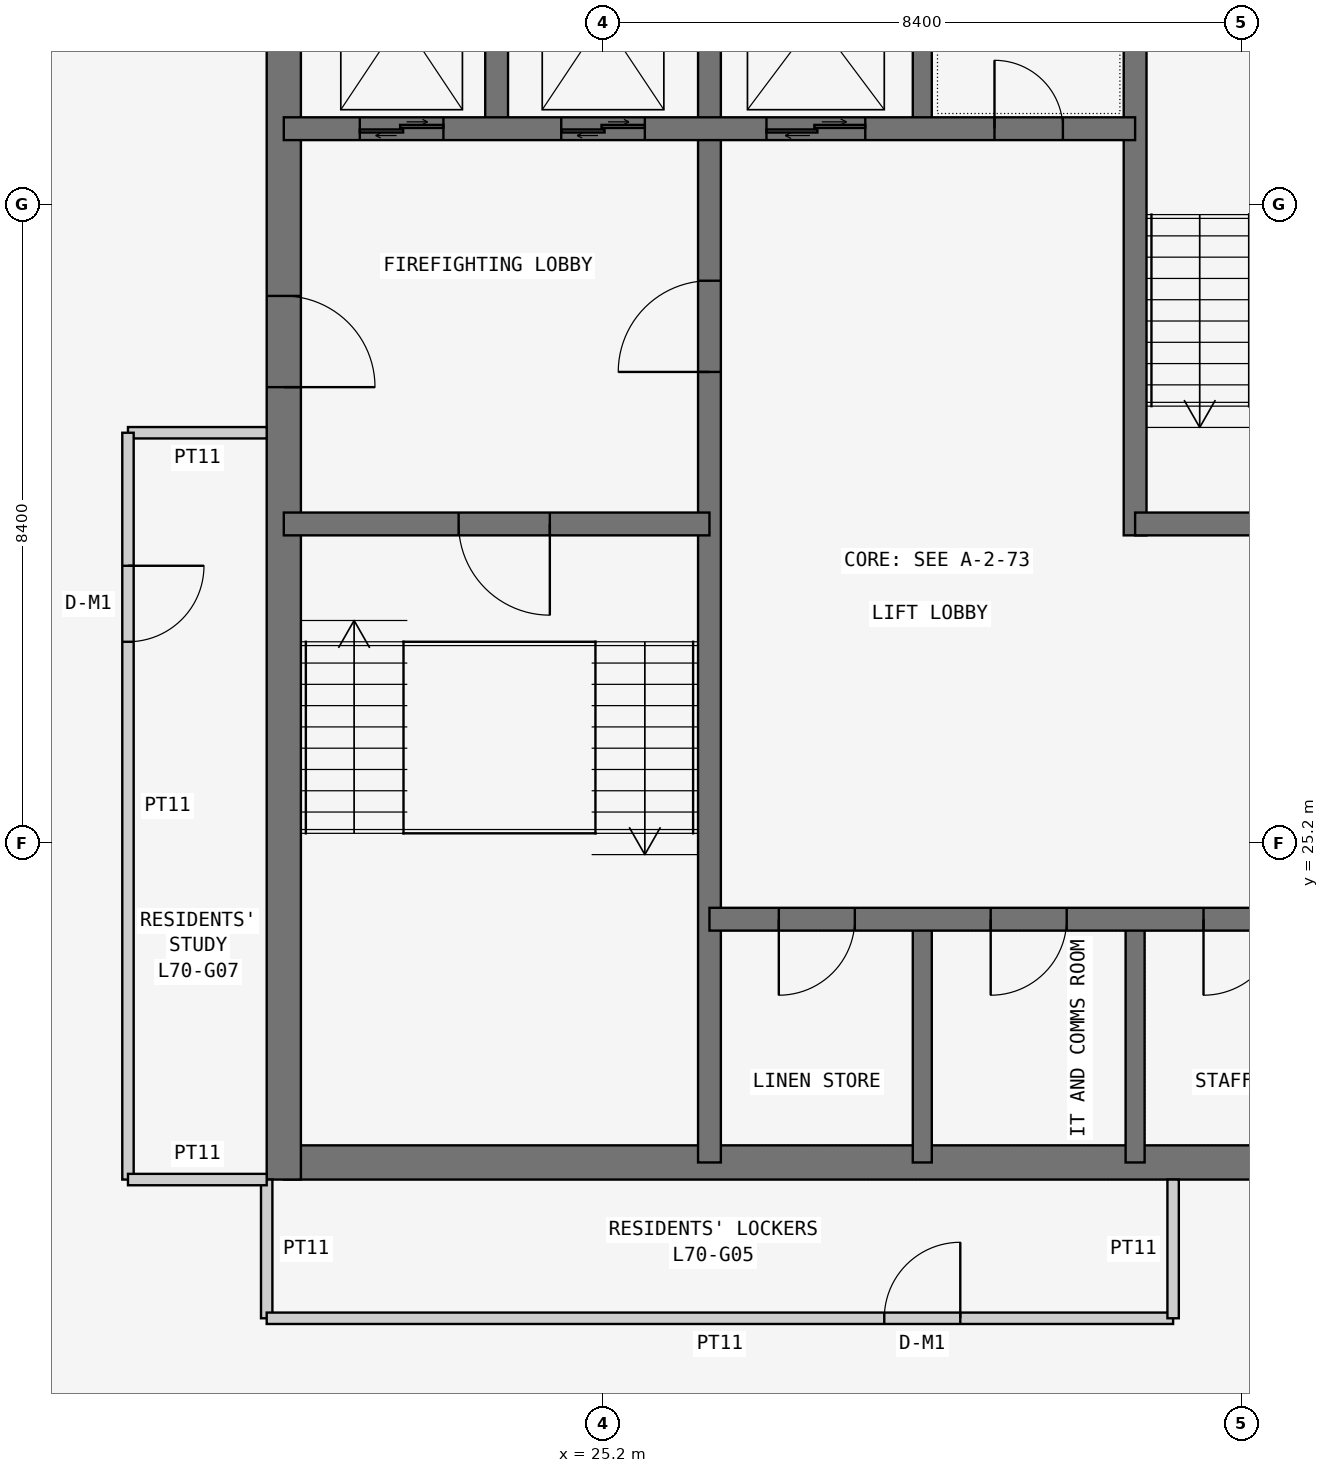
"""IFC4 building model, lengths in metres.
Left out: names, types, materials, properties, quantities, classifications, styles, units other than length and angle.
Written with IfcOpenShell. Run it as: python <this file> out.ifc"""

import sys

from ifc_helpers import new_model, si_unit, direction, frame, frame_2d, origin, place, context, subcontext, project, spatial, rectangle, extrude, element, fill, save


model = new_model("IFC4")
c1 = context("Model", 3, precision=1e-05, world=origin(), true_north=direction((0.0, 1.0)))
c2 = subcontext(c1, "Body", "Model", "MODEL_VIEW")
j1 = project(units=[si_unit("LENGTHUNIT", "METRE"), si_unit("PLANEANGLEUNIT", "RADIAN")], contexts=[c1])
p1 = place(None, origin())
s1 = spatial("IfcSite", under=j1, at=p1, CompositionType="ELEMENT")
p2 = place(p1, origin())
s2 = spatial("IfcBuilding", under=s1, at=p2, CompositionType="ELEMENT")
p3 = place(p2, frame((0.0, 0.0, 268.5)))
s3 = spatial("IfcBuildingStorey", under=s2, at=p3, CompositionType="ELEMENT", Elevation=268.5)
p4 = place(p3, frame((21.0, 21.0, 0.0), z_axis=(0.0, 0.0, 1.0), x_axis=(1.0, 0.0, 0.0)))
e1 = element("IfcWall", 1, at=p4, inside=s3, PredefinedType="SHEAR", context=c2, shape_type="SweptSolid", body=[
    extrude(rectangle(XDim=17.025, YDim=0.45, at=frame_2d((8.512, 0.0))), origin(), (0.0, 0.0, 1.0), 3.6),
])
p5 = place(p3, frame((21.0, 37.8, 0.0), z_axis=(0.0, 0.0, 1.0), x_axis=(0.0, -1.0, 0.0)))
e2 = element("IfcWall", 2, at=p5, inside=s3, PredefinedType="SHEAR", context=c2, shape_type="SweptSolid", body=[
    extrude(rectangle(XDim=17.025, YDim=0.45, at=frame_2d((8.513, 0.0))), origin(), (0.0, 0.0, 1.0), 3.6),
])
p6 = place(p5, frame((5.4, 0.0, 0.0)))
e3 = element("IfcOpeningElement", 3, at=p6, cuts=e2, PredefinedType="OPENING", context=c2, shape_type="SweptSolid", body=[
    extrude(rectangle(XDim=1.2, YDim=2.1, at=frame_2d((0.6, 1.05))), frame((0.0, 0.235, 0.0), z_axis=(0.0, -1.0, 0.0), x_axis=(1.0, 0.0, 0.0)), (0.0, 0.0, 1.0), 0.47),
])
p7 = place(p3, frame((26.6, 21.0, 0.0), z_axis=(0.0, 0.0, 1.0), x_axis=(0.0, 1.0, 0.0)))
e4 = element("IfcWall", 4, at=p7, inside=s3, PredefinedType="SHEAR", context=c2, shape_type="SweptSolid", body=[
    extrude(rectangle(XDim=16.8, YDim=0.3, at=frame_2d((8.4, 0.0))), origin(), (0.0, 0.0, 1.0), 3.6),
])
p8 = place(p7, frame((10.4, 0.0, 0.0)))
e5 = element("IfcOpeningElement", 5, at=p8, cuts=e4, PredefinedType="OPENING", context=c2, shape_type="SweptSolid", body=[
    extrude(rectangle(XDim=1.2, YDim=2.1, at=frame_2d((0.6, 1.05))), frame((0.0, 0.16, 0.0), z_axis=(0.0, -1.0, 0.0), x_axis=(1.0, 0.0, 0.0)), (0.0, 0.0, 1.0), 0.32),
])
p9 = place(p3, frame((21.0, 29.4, 0.0), z_axis=(0.0, 0.0, 1.0), x_axis=(1.0, 0.0, 0.0)))
e6 = element("IfcWall", 6, at=p9, inside=s3, PredefinedType="SHEAR", context=c2, shape_type="SweptSolid", body=[
    extrude(rectangle(XDim=5.6, YDim=0.3, at=frame_2d((2.8, 0.0))), origin(), (0.0, 0.0, 1.0), 3.6),
])
p10 = place(p9, frame((2.3, 0.0, 0.0)))
e7 = element("IfcOpeningElement", 7, at=p10, cuts=e6, PredefinedType="OPENING", context=c2, shape_type="SweptSolid", body=[
    extrude(rectangle(XDim=1.2, YDim=2.1, at=frame_2d((0.6, 1.05))), frame((0.0, 0.16, 0.0), z_axis=(0.0, -1.0, 0.0), x_axis=(1.0, 0.0, 0.0)), (0.0, 0.0, 1.0), 0.32),
])
p11 = place(p3, frame((21.0, 34.6, 0.0), z_axis=(0.0, 0.0, 1.0), x_axis=(1.0, 0.0, 0.0)))
e8 = element("IfcWall", 8, at=p11, inside=s3, PredefinedType="SHEAR", context=c2, shape_type="SweptSolid", body=[
    extrude(rectangle(XDim=11.2, YDim=0.3, at=frame_2d((5.6, 0.0))), origin(), (0.0, 0.0, 1.0), 3.6),
])
p12 = place(p11, frame((9.35, 0.0, 0.0)))
e9 = element("IfcOpeningElement", 9, at=p12, cuts=e8, PredefinedType="OPENING", context=c2, shape_type="SweptSolid", body=[
    extrude(rectangle(XDim=0.9, YDim=2.1, at=frame_2d((0.45, 1.05))), frame((0.0, 0.16, 0.0), z_axis=(0.0, -1.0, 0.0), x_axis=(1.0, 0.0, 0.0)), (0.0, 0.0, 1.0), 0.32),
])
p13 = place(p11, frame((1.0, 0.0, 0.0)))
e10 = element("IfcOpeningElement", 10, at=p13, cuts=e8, PredefinedType="OPENING", context=c2, shape_type="SweptSolid", body=[
    extrude(rectangle(XDim=1.1, YDim=2.1, at=frame_2d((0.55, 1.05))), frame((0.0, 0.16, 0.0), z_axis=(0.0, -1.0, 0.0), x_axis=(1.0, 0.0, 0.0)), (0.0, 0.0, 1.0), 0.32),
])
p14 = place(p11, frame((3.65, 0.0, 0.0)))
e11 = element("IfcOpeningElement", 11, at=p14, cuts=e8, PredefinedType="OPENING", context=c2, shape_type="SweptSolid", body=[
    extrude(rectangle(XDim=1.1, YDim=2.1, at=frame_2d((0.55, 1.05))), frame((0.0, 0.16, 0.0), z_axis=(0.0, -1.0, 0.0), x_axis=(1.0, 0.0, 0.0)), (0.0, 0.0, 1.0), 0.32),
])
p15 = place(p11, frame((6.35, 0.0, 0.0)))
e12 = element("IfcOpeningElement", 12, at=p15, cuts=e8, PredefinedType="OPENING", context=c2, shape_type="SweptSolid", body=[
    extrude(rectangle(XDim=1.3, YDim=2.1, at=frame_2d((0.65, 1.05))), frame((0.0, 0.16, 0.0), z_axis=(0.0, -1.0, 0.0), x_axis=(1.0, 0.0, 0.0)), (0.0, 0.0, 1.0), 0.32),
])
p16 = place(p3, frame((23.8, 34.6, 0.0), z_axis=(0.0, 0.0, 1.0), x_axis=(0.0, 1.0, 0.0)))
e13 = element("IfcWall", 13, at=p16, inside=s3, PredefinedType="SHEAR", context=c2, shape_type="SweptSolid", body=[
    extrude(rectangle(XDim=3.2, YDim=0.3, at=frame_2d((1.6, 0.0))), origin(), (0.0, 0.0, 1.0), 3.6),
])
p17 = place(p3, frame((26.6, 24.2, 0.0), z_axis=(0.0, 0.0, 1.0), x_axis=(1.0, 0.0, 0.0)))
e14 = element("IfcWall", 14, at=p17, inside=s3, PredefinedType="SHEAR", context=c2, shape_type="SweptSolid", body=[
    extrude(rectangle(XDim=11.2, YDim=0.3, at=frame_2d((5.6, 0.0))), origin(), (0.0, 0.0, 1.0), 3.6),
])
p18 = place(p17, frame((0.913, 0.0, 0.0)))
e15 = element("IfcOpeningElement", 15, at=p18, cuts=e14, PredefinedType="OPENING", context=c2, shape_type="SweptSolid", body=[
    extrude(rectangle(XDim=1.0, YDim=2.1, at=frame_2d((0.5, 1.05))), frame((0.0, 0.16, 0.0), z_axis=(0.0, -1.0, 0.0), x_axis=(1.0, 0.0, 0.0)), (0.0, 0.0, 1.0), 0.32),
])
p19 = place(p17, frame((3.7, 0.0, 0.0)))
e16 = element("IfcOpeningElement", 16, at=p19, cuts=e14, PredefinedType="OPENING", context=c2, shape_type="SweptSolid", body=[
    extrude(rectangle(XDim=1.0, YDim=2.1, at=frame_2d((0.5, 1.05))), frame((0.0, 0.16, 0.0), z_axis=(0.0, -1.0, 0.0), x_axis=(1.0, 0.0, 0.0)), (0.0, 0.0, 1.0), 0.32),
])
p20 = place(p17, frame((6.5, 0.0, 0.0)))
e17 = element("IfcOpeningElement", 17, at=p20, cuts=e14, PredefinedType="OPENING", context=c2, shape_type="SweptSolid", body=[
    extrude(rectangle(XDim=1.0, YDim=2.1, at=frame_2d((0.5, 1.05))), frame((0.0, 0.16, 0.0), z_axis=(0.0, -1.0, 0.0), x_axis=(1.0, 0.0, 0.0)), (0.0, 0.0, 1.0), 0.32),
])
p21 = place(p17, frame((9.1, 0.0, 0.0)))
e18 = element("IfcOpeningElement", 18, at=p21, cuts=e14, PredefinedType="OPENING", context=c2, shape_type="SweptSolid", body=[
    extrude(rectangle(XDim=1.1, YDim=2.1, at=frame_2d((0.55, 1.05))), frame((0.0, 0.16, 0.0), z_axis=(0.0, -1.0, 0.0), x_axis=(1.0, 0.0, 0.0)), (0.0, 0.0, 1.0), 0.32),
])
p22 = place(p3, frame((32.2, 29.25, 0.0), z_axis=(0.0, 0.0, 1.0), x_axis=(0.0, 1.0, 0.0)))
e19 = element("IfcWall", 19, at=p22, inside=s3, PredefinedType="SHEAR", context=c2, shape_type="SweptSolid", body=[
    extrude(rectangle(XDim=8.55, YDim=0.3, at=frame_2d((4.275, 0.0))), origin(), (0.0, 0.0, 1.0), 3.6),
])
p23 = place(p3, frame((32.2, 29.4, 0.0), z_axis=(0.0, 0.0, 1.0), x_axis=(1.0, 0.0, 0.0)))
e20 = element("IfcWall", 20, at=p23, inside=s3, PredefinedType="SHEAR", context=c2, shape_type="SweptSolid", body=[
    extrude(rectangle(XDim=5.6, YDim=0.3, at=frame_2d((2.8, 0.0))), origin(), (0.0, 0.0, 1.0), 3.6),
])
p24 = place(p23, frame((2.0, 0.0, 0.0)))
e21 = element("IfcOpeningElement", 21, at=p24, cuts=e20, PredefinedType="OPENING", context=c2, shape_type="SweptSolid", body=[
    extrude(rectangle(XDim=1.2, YDim=2.1, at=frame_2d((0.6, 1.05))), frame((0.0, 0.16, 0.0), z_axis=(0.0, -1.0, 0.0), x_axis=(1.0, 0.0, 0.0)), (0.0, 0.0, 1.0), 0.32),
])
for number, where, z_axis, x_axis in (
    (22, (29.4, 21.0, 0.0), (0.0, 0.0, 1.0), (0.0, 1.0, 0.0)),
    (23, (32.2, 21.0, 0.0), (0.0, 0.0, 1.0), (0.0, 1.0, 0.0)),
    (24, (29.4, 34.6, 0.0), (0.0, 0.0, 1.0), (0.0, 1.0, 0.0)),
):
    element("IfcWall", number, at=place(p3, frame(where, z_axis=z_axis, x_axis=x_axis)), inside=s3, PredefinedType="SHEAR", context=c2, shape_type="SweptSolid", body=[
        extrude(rectangle(XDim=3.2, YDim=0.25, at=frame_2d((1.6, 0.0))), origin(), (0.0, 0.0, 1.0), 3.6),
    ])
p25 = place(p3, frame((20.775, 20.775, 0.0), z_axis=(0.0, 0.0, 1.0), x_axis=(0.0, -1.0, 0.0)))
e25 = element("IfcWall", 25, at=p25, inside=s3, PredefinedType="PARTITIONING", context=c2, shape_type="SweptSolid", body=[
    extrude(rectangle(XDim=1.825, YDim=0.15, at=frame_2d((0.913, 0.0))), origin(), (0.0, 0.0, 1.0), 3.45),
])
p26 = place(p3, frame((20.775, 18.95, 0.0), z_axis=(0.0, 0.0, 1.0), x_axis=(1.0, 0.0, 0.0)))
e26 = element("IfcWall", 26, at=p26, inside=s3, PredefinedType="PARTITIONING", context=c2, shape_type="SweptSolid", body=[
    extrude(rectangle(XDim=11.925, YDim=0.15, at=frame_2d((5.962, 0.0))), origin(), (0.0, 0.0, 1.0), 3.45),
])
p27 = place(p26, frame((8.125, 0.0, 0.0)))
e27 = element("IfcOpeningElement", 27, at=p27, cuts=e26, PredefinedType="OPENING", context=c2, shape_type="SweptSolid", body=[
    extrude(rectangle(XDim=1.0, YDim=2.1, at=frame_2d((0.5, 1.05))), frame((0.0, 0.085, 0.0), z_axis=(0.0, -1.0, 0.0), x_axis=(1.0, 0.0, 0.0)), (0.0, 0.0, 1.0), 0.17),
])
for number, where, z_axis, x_axis in (
    (28, (32.7, 18.95, 0.0), (0.0, 0.0, 1.0), (0.0, 1.0, 0.0)),
    (29, (20.775, 30.6, 0.0), (0.0, 0.0, 1.0), (-1.0, 0.0, 0.0)),
):
    element("IfcWall", number, at=place(p3, frame(where, z_axis=z_axis, x_axis=x_axis)), inside=s3, PredefinedType="PARTITIONING", context=c2, shape_type="SweptSolid", body=[
        extrude(rectangle(XDim=1.825, YDim=0.15, at=frame_2d((0.913, 0.0))), origin(), (0.0, 0.0, 1.0), 3.45),
    ])
p28 = place(p3, frame((18.95, 30.6, 0.0), z_axis=(0.0, 0.0, 1.0), x_axis=(0.0, -1.0, 0.0)))
e30 = element("IfcWall", 30, at=p28, inside=s3, PredefinedType="PARTITIONING", context=c2, shape_type="SweptSolid", body=[
    extrude(rectangle(XDim=9.825, YDim=0.15, at=frame_2d((4.913, 0.0))), origin(), (0.0, 0.0, 1.0), 3.45),
])
p29 = place(p28, frame((1.75, 0.0, 0.0)))
e31 = element("IfcOpeningElement", 31, at=p29, cuts=e30, PredefinedType="OPENING", context=c2, shape_type="SweptSolid", body=[
    extrude(rectangle(XDim=1.0, YDim=2.1, at=frame_2d((0.5, 1.05))), frame((0.0, 0.085, 0.0), z_axis=(0.0, -1.0, 0.0), x_axis=(1.0, 0.0, 0.0)), (0.0, 0.0, 1.0), 0.17),
])
p30 = place(p3, frame((18.95, 20.775, 0.0), z_axis=(0.0, 0.0, 1.0), x_axis=(1.0, 0.0, 0.0)))
e32 = element("IfcWall", 32, at=p30, inside=s3, PredefinedType="PARTITIONING", context=c2, shape_type="SweptSolid", body=[
    extrude(rectangle(XDim=1.825, YDim=0.15, at=frame_2d((0.913, 0.0))), origin(), (0.0, 0.0, 1.0), 3.45),
])
p31 = place(p27, origin())
e33 = element("IfcDoor", 33, at=p31, inside=s3, OperationType="SINGLE_SWING_RIGHT", PredefinedType="DOOR", context=c2, shape_type="SweptSolid", body=[
    extrude(rectangle(XDim=1.0, YDim=2.1, at=frame_2d((0.5, 1.05))), frame((0.0, 0.025, 0.0), z_axis=(0.0, -1.0, 0.0), x_axis=(1.0, 0.0, 0.0)), (0.0, 0.0, 1.0), 0.05),
])
fill(e27, e33)
p32 = place(p29, origin())
e34 = element("IfcDoor", 34, at=p32, inside=s3, OperationType="SINGLE_SWING_LEFT", PredefinedType="DOOR", context=c2, shape_type="SweptSolid", body=[
    extrude(rectangle(XDim=1.0, YDim=2.1, at=frame_2d((0.5, 1.05))), frame((0.0, 0.025, 0.0), z_axis=(0.0, -1.0, 0.0), x_axis=(1.0, 0.0, 0.0)), (0.0, 0.0, 1.0), 0.05),
])
fill(e31, e34)
p33 = place(p6, origin())
e35 = element("IfcDoor", 35, at=p33, inside=s3, OperationType="SINGLE_SWING_RIGHT", PredefinedType="DOOR", context=c2, shape_type="SweptSolid", body=[
    extrude(rectangle(XDim=1.2, YDim=2.1, at=frame_2d((0.6, 1.05))), frame((0.0, 0.025, 0.0), z_axis=(0.0, -1.0, 0.0), x_axis=(1.0, 0.0, 0.0)), (0.0, 0.0, 1.0), 0.05),
])
fill(e3, e35)
p34 = place(p10, frame((1.2, 0.0, 0.0), z_axis=(0.0, 0.0, 1.0), x_axis=(-1.0, 0.0, 0.0)))
e36 = element("IfcDoor", 36, at=p34, inside=s3, OperationType="SINGLE_SWING_LEFT", PredefinedType="DOOR", context=c2, shape_type="SweptSolid", body=[
    extrude(rectangle(XDim=1.2, YDim=2.1, at=frame_2d((0.6, 1.05))), frame((0.0, 0.025, 0.0), z_axis=(0.0, -1.0, 0.0), x_axis=(1.0, 0.0, 0.0)), (0.0, 0.0, 1.0), 0.05),
])
fill(e7, e36)
p35 = place(p8, origin())
e37 = element("IfcDoor", 37, at=p35, inside=s3, OperationType="SINGLE_SWING_LEFT", PredefinedType="DOOR", context=c2, shape_type="SweptSolid", body=[
    extrude(rectangle(XDim=1.2, YDim=2.1, at=frame_2d((0.6, 1.05))), frame((0.0, 0.025, 0.0), z_axis=(0.0, -1.0, 0.0), x_axis=(1.0, 0.0, 0.0)), (0.0, 0.0, 1.0), 0.05),
])
fill(e5, e37)
p36 = place(p12, origin())
e38 = element("IfcDoor", 38, at=p36, inside=s3, OperationType="SINGLE_SWING_LEFT", PredefinedType="DOOR", context=c2, shape_type="SweptSolid", body=[
    extrude(rectangle(XDim=0.9, YDim=2.1, at=frame_2d((0.45, 1.05))), frame((0.0, 0.025, 0.0), z_axis=(0.0, -1.0, 0.0), x_axis=(1.0, 0.0, 0.0)), (0.0, 0.0, 1.0), 0.05),
])
fill(e9, e38)
p37 = place(p18, frame((1.0, 0.0, 0.0), z_axis=(0.0, 0.0, 1.0), x_axis=(-1.0, 0.0, 0.0)))
e39 = element("IfcDoor", 39, at=p37, inside=s3, OperationType="SINGLE_SWING_RIGHT", PredefinedType="DOOR", context=c2, shape_type="SweptSolid", body=[
    extrude(rectangle(XDim=1.0, YDim=2.1, at=frame_2d((0.5, 1.05))), frame((0.0, 0.025, 0.0), z_axis=(0.0, -1.0, 0.0), x_axis=(1.0, 0.0, 0.0)), (0.0, 0.0, 1.0), 0.05),
])
fill(e15, e39)
p38 = place(p19, frame((1.0, 0.0, 0.0), z_axis=(0.0, 0.0, 1.0), x_axis=(-1.0, 0.0, 0.0)))
e40 = element("IfcDoor", 40, at=p38, inside=s3, OperationType="SINGLE_SWING_RIGHT", PredefinedType="DOOR", context=c2, shape_type="SweptSolid", body=[
    extrude(rectangle(XDim=1.0, YDim=2.1, at=frame_2d((0.5, 1.05))), frame((0.0, 0.025, 0.0), z_axis=(0.0, -1.0, 0.0), x_axis=(1.0, 0.0, 0.0)), (0.0, 0.0, 1.0), 0.05),
])
fill(e16, e40)
p39 = place(p20, frame((1.0, 0.0, 0.0), z_axis=(0.0, 0.0, 1.0), x_axis=(-1.0, 0.0, 0.0)))
e41 = element("IfcDoor", 41, at=p39, inside=s3, OperationType="SINGLE_SWING_RIGHT", PredefinedType="DOOR", context=c2, shape_type="SweptSolid", body=[
    extrude(rectangle(XDim=1.0, YDim=2.1, at=frame_2d((0.5, 1.05))), frame((0.0, 0.025, 0.0), z_axis=(0.0, -1.0, 0.0), x_axis=(1.0, 0.0, 0.0)), (0.0, 0.0, 1.0), 0.05),
])
fill(e17, e41)
p40 = place(p13, origin())
e42 = element("IfcDoor", 42, at=p40, inside=s3, OperationType="DOUBLE_DOOR_SLIDING", PredefinedType="DOOR", context=c2, shape_type="SweptSolid", body=[
    extrude(rectangle(XDim=1.1, YDim=2.1, at=frame_2d((0.55, 1.05))), frame((0.0, 0.025, 0.0), z_axis=(0.0, -1.0, 0.0), x_axis=(1.0, 0.0, 0.0)), (0.0, 0.0, 1.0), 0.05),
])
fill(e10, e42)
p41 = place(p14, origin())
e43 = element("IfcDoor", 43, at=p41, inside=s3, OperationType="DOUBLE_DOOR_SLIDING", PredefinedType="DOOR", context=c2, shape_type="SweptSolid", body=[
    extrude(rectangle(XDim=1.1, YDim=2.1, at=frame_2d((0.55, 1.05))), frame((0.0, 0.025, 0.0), z_axis=(0.0, -1.0, 0.0), x_axis=(1.0, 0.0, 0.0)), (0.0, 0.0, 1.0), 0.05),
])
fill(e11, e43)
p42 = place(p15, origin())
e44 = element("IfcDoor", 44, at=p42, inside=s3, OperationType="DOUBLE_DOOR_SLIDING", PredefinedType="DOOR", context=c2, shape_type="SweptSolid", body=[
    extrude(rectangle(XDim=1.3, YDim=2.1, at=frame_2d((0.65, 1.05))), frame((0.0, 0.025, 0.0), z_axis=(0.0, -1.0, 0.0), x_axis=(1.0, 0.0, 0.0)), (0.0, 0.0, 1.0), 0.05),
])
fill(e12, e44)
save(model, sys.argv[1])
